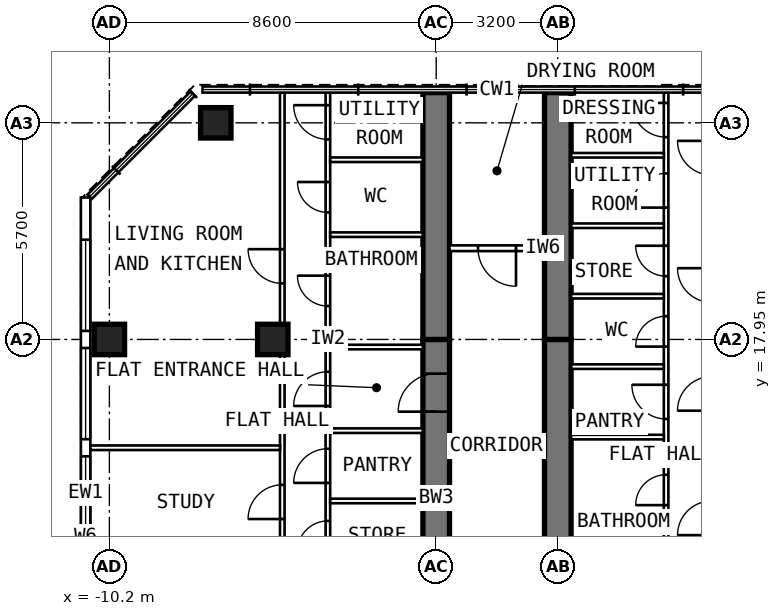
"""IFC4 building model, lengths in metres.
Left out: names, types, materials, properties, quantities, classifications, styles, units other than length and angle.
Written with IfcOpenShell. Run it as: python <this file> out.ifc"""

import sys

from ifc_helpers import new_model, si_unit, direction, frame, frame_2d, origin, origin_2d, place, context, subcontext, project, spatial, rectangle, extrude, element, fill, save


model = new_model("IFC4")
c1 = context("Model", 3, precision=1e-05, world=origin(), true_north=direction((0.0, 1.0)))
c2 = subcontext(c1, "Body", "Model", "MODEL_VIEW")
j1 = project(units=[si_unit("LENGTHUNIT", "METRE"), si_unit("PLANEANGLEUNIT", "RADIAN")], contexts=[c1])
p1 = place(None, origin())
s1 = spatial("IfcSite", under=j1, at=p1, CompositionType="ELEMENT")
p2 = place(p1, origin())
s2 = spatial("IfcBuilding", under=s1, at=p2, CompositionType="ELEMENT")
p3 = place(p2, frame((0.0, 0.0, 274.6)))
s3 = spatial("IfcBuildingStorey", under=s2, at=p3, CompositionType="ELEMENT", Elevation=274.6)
for number, where, z_axis, x_axis in (
    (1, (-10.2, 17.95, 0.0), (0.0, 0.0, 1.0), (0.0, 1.0, 0.0)),
    (2, (-7.4, 23.65, 0.0), (0.0, 0.0, 1.0), (0.0, 1.0, 0.0)),
    (3, (-5.9, 17.95, 0.0), (0.0, 0.0, 1.0), (0.0, 1.0, 0.0)),
):
    element("IfcColumn", number, at=place(p3, frame(where, z_axis=z_axis, x_axis=x_axis)), inside=s3, PredefinedType="COLUMN", context=c2, shape_type="SweptSolid", body=[
        extrude(rectangle(XDim=0.8, YDim=0.8, at=origin_2d()), origin(), (0.0, 0.0, 1.0), 3.6),
    ])
p4 = place(p3, frame((-1.6, 9.6, 0.0), z_axis=(0.0, 0.0, 1.0), x_axis=(0.0, 1.0, 0.0)))
e4 = element("IfcWall", 4, at=p4, inside=s3, PredefinedType="SHEAR", context=c2, shape_type="SweptSolid", body=[
    extrude(rectangle(XDim=8.35, YDim=0.7, at=frame_2d((4.175, 0.0))), origin(), (0.0, 0.0, 1.0), 3.6),
])
p5 = place(p4, frame((6.45, 0.0, 0.0)))
e5 = element("IfcOpeningElement", 5, at=p5, cuts=e4, PredefinedType="OPENING", context=c2, shape_type="SweptSolid", body=[
    extrude(rectangle(XDim=1.0, YDim=2.1, at=frame_2d((0.5, 1.05))), frame((0.0, 0.362, 0.0), z_axis=(0.0, -1.0, 0.0), x_axis=(1.0, 0.0, 0.0)), (0.0, 0.0, 1.0), 0.724),
])
p6 = place(p3, frame((-1.6, 17.95, 0.0), z_axis=(0.0, 0.0, 1.0), x_axis=(0.0, 1.0, 0.0)))
e6 = element("IfcWall", 6, at=p6, inside=s3, PredefinedType="SHEAR", context=c2, shape_type="SweptSolid", body=[
    extrude(rectangle(XDim=6.495, YDim=0.7, at=frame_2d((3.248, 0.0))), origin(), (0.0, 0.0, 1.0), 3.6),
])
p7 = place(p3, frame((1.6, 9.6, 0.0), z_axis=(0.0, 0.0, 1.0), x_axis=(0.0, 1.0, 0.0)))
e7 = element("IfcWall", 7, at=p7, inside=s3, PredefinedType="SHEAR", context=c2, shape_type="SweptSolid", body=[
    extrude(rectangle(XDim=8.35, YDim=0.7, at=frame_2d((4.175, 0.0))), origin(), (0.0, 0.0, 1.0), 3.6),
])
p8 = place(p7, frame((1.3, 0.0, 0.0)))
e8 = element("IfcOpeningElement", 8, at=p8, cuts=e7, PredefinedType="OPENING", context=c2, shape_type="SweptSolid", body=[
    extrude(rectangle(XDim=1.0, YDim=2.1, at=frame_2d((0.5, 1.05))), frame((0.0, 0.362, 0.0), z_axis=(0.0, -1.0, 0.0), x_axis=(1.0, 0.0, 0.0)), (0.0, 0.0, 1.0), 0.724),
])
p9 = place(p3, frame((1.6, 17.95, 0.0), z_axis=(0.0, 0.0, 1.0), x_axis=(0.0, 1.0, 0.0)))
e9 = element("IfcWall", 9, at=p9, inside=s3, PredefinedType="SHEAR", context=c2, shape_type="SweptSolid", body=[
    extrude(rectangle(XDim=6.495, YDim=0.7, at=frame_2d((3.248, 0.0))), origin(), (0.0, 0.0, 1.0), 3.6),
])
p10 = place(p3, frame((-10.825, 6.148, 0.0), z_axis=(0.0, 0.0, 1.0), x_axis=(0.0, 1.0, 0.0)))
e10 = element("IfcWall", 10, at=p10, inside=s3, PredefinedType="SOLIDWALL", context=c2, shape_type="SweptSolid", body=[
    extrude(rectangle(XDim=15.537, YDim=0.25, at=frame_2d((7.769, 0.0))), origin(), (0.0, 0.0, 1.0), 3.35),
])
p11 = place(p10, frame((0.627, 0.0, 0.6)))
e11 = element("IfcOpeningElement", 11, at=p11, cuts=e10, PredefinedType="OPENING", context=c2, shape_type="SweptSolid", body=[
    extrude(rectangle(XDim=2.4, YDim=2.0, at=frame_2d((1.2, 1.0))), frame((0.0, 0.137, 0.0), z_axis=(0.0, -1.0, 0.0), x_axis=(1.0, 0.0, 0.0)), (0.0, 0.0, 1.0), 0.274),
])
p12 = place(p10, frame((3.477, 0.0, 0.6)))
e12 = element("IfcOpeningElement", 12, at=p12, cuts=e10, PredefinedType="OPENING", context=c2, shape_type="SweptSolid", body=[
    extrude(rectangle(XDim=2.4, YDim=2.0, at=frame_2d((1.2, 1.0))), frame((0.0, 0.137, 0.0), z_axis=(0.0, -1.0, 0.0), x_axis=(1.0, 0.0, 0.0)), (0.0, 0.0, 1.0), 0.274),
])
p13 = place(p10, frame((6.327, 0.0, 0.6)))
e13 = element("IfcOpeningElement", 13, at=p13, cuts=e10, PredefinedType="OPENING", context=c2, shape_type="SweptSolid", body=[
    extrude(rectangle(XDim=2.4, YDim=2.0, at=frame_2d((1.2, 1.0))), frame((0.0, 0.137, 0.0), z_axis=(0.0, -1.0, 0.0), x_axis=(1.0, 0.0, 0.0)), (0.0, 0.0, 1.0), 0.274),
])
p14 = place(p10, frame((9.177, 0.0, 0.6)))
e14 = element("IfcOpeningElement", 14, at=p14, cuts=e10, PredefinedType="OPENING", context=c2, shape_type="SweptSolid", body=[
    extrude(rectangle(XDim=2.4, YDim=2.0, at=frame_2d((1.2, 1.0))), frame((0.0, 0.137, 0.0), z_axis=(0.0, -1.0, 0.0), x_axis=(1.0, 0.0, 0.0)), (0.0, 0.0, 1.0), 0.274),
])
p15 = place(p10, frame((12.027, 0.0, 0.6)))
e15 = element("IfcOpeningElement", 15, at=p15, cuts=e10, PredefinedType="OPENING", context=c2, shape_type="SweptSolid", body=[
    extrude(rectangle(XDim=2.4, YDim=2.0, at=frame_2d((1.2, 1.0))), frame((0.0, 0.137, 0.0), z_axis=(0.0, -1.0, 0.0), x_axis=(1.0, 0.0, 0.0)), (0.0, 0.0, 1.0), 0.274),
])
p16 = place(p3, frame((-4.45, 9.875, 0.0), z_axis=(0.0, 0.0, 1.0), x_axis=(0.0, 1.0, 0.0)))
e16 = element("IfcWall", 16, at=p16, inside=s3, PredefinedType="PARTITIONING", context=c2, shape_type="SweptSolid", body=[
    extrude(rectangle(XDim=14.57, YDim=0.12, at=frame_2d((7.285, 0.0))), origin(), (0.0, 0.0, 1.0), 3.35),
])
p17 = place(p16, frame((0.6, 0.0, 0.0)))
e17 = element("IfcOpeningElement", 17, at=p17, cuts=e16, PredefinedType="OPENING", context=c2, shape_type="SweptSolid", body=[
    extrude(rectangle(XDim=0.9, YDim=2.1, at=frame_2d((0.45, 1.05))), frame((0.0, 0.072, 0.0), z_axis=(0.0, -1.0, 0.0), x_axis=(1.0, 0.0, 0.0)), (0.0, 0.0, 1.0), 0.144),
])
p18 = place(p16, frame((2.5, 0.0, 0.0)))
e18 = element("IfcOpeningElement", 18, at=p18, cuts=e16, PredefinedType="OPENING", context=c2, shape_type="SweptSolid", body=[
    extrude(rectangle(XDim=0.8, YDim=2.1, at=frame_2d((0.4, 1.05))), frame((0.0, 0.072, 0.0), z_axis=(0.0, -1.0, 0.0), x_axis=(1.0, 0.0, 0.0)), (0.0, 0.0, 1.0), 0.144),
])
p19 = place(p16, frame((4.3, 0.0, 0.0)))
e19 = element("IfcOpeningElement", 19, at=p19, cuts=e16, PredefinedType="OPENING", context=c2, shape_type="SweptSolid", body=[
    extrude(rectangle(XDim=0.9, YDim=2.1, at=frame_2d((0.45, 1.05))), frame((0.0, 0.072, 0.0), z_axis=(0.0, -1.0, 0.0), x_axis=(1.0, 0.0, 0.0)), (0.0, 0.0, 1.0), 0.144),
])
p20 = place(p16, frame((6.325, 0.0, 0.0)))
e20 = element("IfcOpeningElement", 20, at=p20, cuts=e16, PredefinedType="OPENING", context=c2, shape_type="SweptSolid", body=[
    extrude(rectangle(XDim=0.9, YDim=2.1, at=frame_2d((0.45, 1.05))), frame((0.0, 0.072, 0.0), z_axis=(0.0, -1.0, 0.0), x_axis=(1.0, 0.0, 0.0)), (0.0, 0.0, 1.0), 0.144),
])
p21 = place(p16, frame((8.954, 0.0, 0.0)))
e21 = element("IfcOpeningElement", 21, at=p21, cuts=e16, PredefinedType="OPENING", context=c2, shape_type="SweptSolid", body=[
    extrude(rectangle(XDim=0.8, YDim=2.1, at=frame_2d((0.4, 1.05))), frame((0.0, 0.072, 0.0), z_axis=(0.0, -1.0, 0.0), x_axis=(1.0, 0.0, 0.0)), (0.0, 0.0, 1.0), 0.144),
])
p22 = place(p16, frame((11.418, 0.0, 0.0)))
e22 = element("IfcOpeningElement", 22, at=p22, cuts=e16, PredefinedType="OPENING", context=c2, shape_type="SweptSolid", body=[
    extrude(rectangle(XDim=0.8, YDim=2.1, at=frame_2d((0.4, 1.05))), frame((0.0, 0.072, 0.0), z_axis=(0.0, -1.0, 0.0), x_axis=(1.0, 0.0, 0.0)), (0.0, 0.0, 1.0), 0.144),
])
p23 = place(p16, frame((13.339, 0.0, 0.0)))
e23 = element("IfcOpeningElement", 23, at=p23, cuts=e16, PredefinedType="OPENING", context=c2, shape_type="SweptSolid", body=[
    extrude(rectangle(XDim=0.9, YDim=2.1, at=frame_2d((0.45, 1.05))), frame((0.0, 0.072, 0.0), z_axis=(0.0, -1.0, 0.0), x_axis=(1.0, 0.0, 0.0)), (0.0, 0.0, 1.0), 0.144),
])
p24 = place(p3, frame((-5.65, 9.6, 0.0), z_axis=(0.0, 0.0, 1.0), x_axis=(0.0, 1.0, 0.0)))
e24 = element("IfcWall", 24, at=p24, inside=s3, PredefinedType="PARTITIONING", context=c2, shape_type="SweptSolid", body=[
    extrude(rectangle(XDim=14.845, YDim=0.12, at=frame_2d((7.422, 0.0))), origin(), (0.0, 0.0, 1.0), 3.35),
])
p25 = place(p24, frame((1.075, 0.0, 0.0)))
e25 = element("IfcOpeningElement", 25, at=p25, cuts=e24, PredefinedType="OPENING", context=c2, shape_type="SweptSolid", body=[
    extrude(rectangle(XDim=0.9, YDim=2.1, at=frame_2d((0.45, 1.05))), frame((0.0, 0.072, 0.0), z_axis=(0.0, -1.0, 0.0), x_axis=(1.0, 0.0, 0.0)), (0.0, 0.0, 1.0), 0.144),
])
p26 = place(p24, frame((3.625, 0.0, 0.0)))
e26 = element("IfcOpeningElement", 26, at=p26, cuts=e24, PredefinedType="OPENING", context=c2, shape_type="SweptSolid", body=[
    extrude(rectangle(XDim=0.9, YDim=2.1, at=frame_2d((0.45, 1.05))), frame((0.0, 0.072, 0.0), z_axis=(0.0, -1.0, 0.0), x_axis=(1.0, 0.0, 0.0)), (0.0, 0.0, 1.0), 0.144),
])
p27 = place(p24, frame((9.825, 0.0, 0.0)))
e27 = element("IfcOpeningElement", 27, at=p27, cuts=e24, PredefinedType="OPENING", context=c2, shape_type="SweptSolid", body=[
    extrude(rectangle(XDim=0.9, YDim=2.1, at=frame_2d((0.45, 1.05))), frame((0.0, 0.072, 0.0), z_axis=(0.0, -1.0, 0.0), x_axis=(1.0, 0.0, 0.0)), (0.0, 0.0, 1.0), 0.144),
])
p28 = place(p3, frame((-5.71, 15.1, 0.0), z_axis=(0.0, 0.0, 1.0), x_axis=(-1.0, 0.0, 0.0)))
e28 = element("IfcWall", 28, at=p28, inside=s3, PredefinedType="PARTITIONING", context=c2, shape_type="SweptSolid", body=[
    extrude(rectangle(XDim=4.99, YDim=0.12, at=frame_2d((2.495, 0.0))), origin(), (0.0, 0.0, 1.0), 3.35),
])
for number, where, z_axis, x_axis in (
    (29, (-1.95, 13.7, 0.0), (0.0, 0.0, 1.0), (-1.0, 0.0, 0.0)),
    (30, (-1.95, 15.55, 0.0), (0.0, 0.0, 1.0), (-1.0, 0.0, 0.0)),
):
    element("IfcWall", number, at=place(p3, frame(where, z_axis=z_axis, x_axis=x_axis)), inside=s3, PredefinedType="PARTITIONING", context=c2, shape_type="SweptSolid", body=[
        extrude(rectangle(XDim=2.44, YDim=0.12, at=frame_2d((1.22, 0.0))), origin(), (0.0, 0.0, 1.0), 3.35),
    ])
p29 = place(p3, frame((-1.95, 17.75, 0.0), z_axis=(0.0, 0.0, 1.0), x_axis=(-1.0, 0.0, 0.0)))
e31 = element("IfcWall", 31, at=p29, inside=s3, PredefinedType="PARTITIONING", context=c2, shape_type="SweptSolid", body=[
    extrude(rectangle(XDim=2.44, YDim=0.12, at=frame_2d((1.22, 0.0))), origin(), (0.0, 0.0, 1.0), 2.45),
])
for number, where, z_axis, x_axis in (
    (32, (-1.95, 20.707, 0.0), (0.0, 0.0, 1.0), (-1.0, 0.0, 0.0)),
    (33, (-1.95, 22.678, 0.0), (0.0, 0.0, 1.0), (-1.0, 0.0, 0.0)),
):
    element("IfcWall", number, at=place(p3, frame(where, z_axis=z_axis, x_axis=x_axis)), inside=s3, PredefinedType="PARTITIONING", context=c2, shape_type="SweptSolid", body=[
        extrude(rectangle(XDim=2.44, YDim=0.12, at=frame_2d((1.22, 0.0))), origin(), (0.0, 0.0, 1.0), 3.35),
    ])
p30 = place(p3, frame((4.45, 9.875, 0.0), z_axis=(0.0, 0.0, 1.0), x_axis=(0.0, 1.0, 0.0)))
e34 = element("IfcWall", 34, at=p30, inside=s3, PredefinedType="PARTITIONING", context=c2, shape_type="SweptSolid", body=[
    extrude(rectangle(XDim=14.57, YDim=0.12, at=frame_2d((7.285, 0.0))), origin(), (0.0, 0.0, 1.0), 3.35),
])
p31 = place(p30, frame((0.975, 0.0, 0.0)))
e35 = element("IfcOpeningElement", 35, at=p31, cuts=e34, PredefinedType="OPENING", context=c2, shape_type="SweptSolid", body=[
    extrude(rectangle(XDim=0.9, YDim=2.1, at=frame_2d((0.45, 1.05))), frame((0.0, 0.072, 0.0), z_axis=(0.0, -1.0, 0.0), x_axis=(1.0, 0.0, 0.0)), (0.0, 0.0, 1.0), 0.144),
])
p32 = place(p30, frame((3.715, 0.0, 0.0)))
e36 = element("IfcOpeningElement", 36, at=p32, cuts=e34, PredefinedType="OPENING", context=c2, shape_type="SweptSolid", body=[
    extrude(rectangle(XDim=0.8, YDim=2.1, at=frame_2d((0.4, 1.05))), frame((0.0, 0.072, 0.0), z_axis=(0.0, -1.0, 0.0), x_axis=(1.0, 0.0, 0.0)), (0.0, 0.0, 1.0), 0.144),
])
p33 = place(p30, frame((5.983, 0.0, 0.0)))
e37 = element("IfcOpeningElement", 37, at=p33, cuts=e34, PredefinedType="OPENING", context=c2, shape_type="SweptSolid", body=[
    extrude(rectangle(XDim=0.9, YDim=2.1, at=frame_2d((0.45, 1.05))), frame((0.0, 0.072, 0.0), z_axis=(0.0, -1.0, 0.0), x_axis=(1.0, 0.0, 0.0)), (0.0, 0.0, 1.0), 0.144),
])
p34 = place(p30, frame((7.886, 0.0, 0.0)))
e38 = element("IfcOpeningElement", 38, at=p34, cuts=e34, PredefinedType="OPENING", context=c2, shape_type="SweptSolid", body=[
    extrude(rectangle(XDim=0.8, YDim=2.1, at=frame_2d((0.4, 1.05))), frame((0.0, 0.072, 0.0), z_axis=(0.0, -1.0, 0.0), x_axis=(1.0, 0.0, 0.0)), (0.0, 0.0, 1.0), 0.144),
])
p35 = place(p30, frame((9.74, 0.0, 0.0)))
e39 = element("IfcOpeningElement", 39, at=p35, cuts=e34, PredefinedType="OPENING", context=c2, shape_type="SweptSolid", body=[
    extrude(rectangle(XDim=0.8, YDim=2.1, at=frame_2d((0.4, 1.05))), frame((0.0, 0.072, 0.0), z_axis=(0.0, -1.0, 0.0), x_axis=(1.0, 0.0, 0.0)), (0.0, 0.0, 1.0), 0.144),
])
p36 = place(p30, frame((11.544, 0.0, 0.0)))
e40 = element("IfcOpeningElement", 40, at=p36, cuts=e34, PredefinedType="OPENING", context=c2, shape_type="SweptSolid", body=[
    extrude(rectangle(XDim=0.9, YDim=2.1, at=frame_2d((0.45, 1.05))), frame((0.0, 0.072, 0.0), z_axis=(0.0, -1.0, 0.0), x_axis=(1.0, 0.0, 0.0)), (0.0, 0.0, 1.0), 0.144),
])
p37 = place(p30, frame((13.398, 0.0, 0.0)))
e41 = element("IfcOpeningElement", 41, at=p37, cuts=e34, PredefinedType="OPENING", context=c2, shape_type="SweptSolid", body=[
    extrude(rectangle(XDim=0.9, YDim=2.1, at=frame_2d((0.45, 1.05))), frame((0.0, 0.072, 0.0), z_axis=(0.0, -1.0, 0.0), x_axis=(1.0, 0.0, 0.0)), (0.0, 0.0, 1.0), 0.144),
])
for number, where, z_axis, x_axis in (
    (42, (1.95, 15.381, 0.0), (0.0, 0.0, 1.0), (1.0, 0.0, 0.0)),
    (43, (1.95, 17.235, 0.0), (0.0, 0.0, 1.0), (1.0, 0.0, 0.0)),
    (44, (1.95, 19.088, 0.0), (0.0, 0.0, 1.0), (1.0, 0.0, 0.0)),
    (45, (1.95, 20.942, 0.0), (0.0, 0.0, 1.0), (1.0, 0.0, 0.0)),
    (46, (1.95, 22.796, 0.0), (0.0, 0.0, 1.0), (1.0, 0.0, 0.0)),
):
    element("IfcWall", number, at=place(p3, frame(where, z_axis=z_axis, x_axis=x_axis)), inside=s3, PredefinedType="PARTITIONING", context=c2, shape_type="SweptSolid", body=[
        extrude(rectangle(XDim=2.44, YDim=0.12, at=frame_2d((1.22, 0.0))), origin(), (0.0, 0.0, 1.0), 3.35),
    ])
p38 = place(p3, frame((1.25, 20.35, 0.0), z_axis=(0.0, 0.0, 1.0), x_axis=(-1.0, 0.0, 0.0)))
e47 = element("IfcWall", 47, at=p38, inside=s3, PredefinedType="PARTITIONING", context=c2, shape_type="SweptSolid", body=[
    extrude(rectangle(XDim=2.5, YDim=0.15, at=frame_2d((1.25, 0.0))), origin(), (0.0, 0.0, 1.0), 3.35),
])
p39 = place(p38, frame((0.75, 0.0, 0.0)))
e48 = element("IfcOpeningElement", 48, at=p39, cuts=e47, PredefinedType="OPENING", context=c2, shape_type="SweptSolid", body=[
    extrude(rectangle(XDim=1.0, YDim=2.1, at=frame_2d((0.5, 1.05))), frame((0.0, 0.087, 0.0), z_axis=(0.0, -1.0, 0.0), x_axis=(1.0, 0.0, 0.0)), (0.0, 0.0, 1.0), 0.174),
])
p40 = place(p13, origin())
e49 = element("IfcWindow", 49, at=p40, inside=s3, PartitioningType="SINGLE_PANEL", PredefinedType="WINDOW", context=c2, shape_type="SweptSolid", body=[
    extrude(rectangle(XDim=2.4, YDim=2.0, at=frame_2d((1.2, 1.0))), frame((0.0, 0.03, 0.0), z_axis=(0.0, -1.0, 0.0), x_axis=(1.0, 0.0, 0.0)), (0.0, 0.0, 1.0), 0.06),
])
fill(e13, e49)
p41 = place(p14, origin())
e50 = element("IfcWindow", 50, at=p41, inside=s3, PartitioningType="SINGLE_PANEL", PredefinedType="WINDOW", context=c2, shape_type="SweptSolid", body=[
    extrude(rectangle(XDim=2.4, YDim=2.0, at=frame_2d((1.2, 1.0))), frame((0.0, 0.03, 0.0), z_axis=(0.0, -1.0, 0.0), x_axis=(1.0, 0.0, 0.0)), (0.0, 0.0, 1.0), 0.06),
])
fill(e14, e50)
p42 = place(p15, origin())
e51 = element("IfcWindow", 51, at=p42, inside=s3, PartitioningType="SINGLE_PANEL", PredefinedType="WINDOW", context=c2, shape_type="SweptSolid", body=[
    extrude(rectangle(XDim=2.4, YDim=2.0, at=frame_2d((1.2, 1.0))), frame((0.0, 0.03, 0.0), z_axis=(0.0, -1.0, 0.0), x_axis=(1.0, 0.0, 0.0)), (0.0, 0.0, 1.0), 0.06),
])
fill(e15, e51)
p43 = place(p5, origin())
e52 = element("IfcDoor", 52, at=p43, inside=s3, OperationType="SINGLE_SWING_LEFT", PredefinedType="DOOR", context=c2, shape_type="SweptSolid", body=[
    extrude(rectangle(XDim=1.0, YDim=2.1, at=frame_2d((0.5, 1.05))), frame((0.0, 0.1, 0.0), z_axis=(0.0, -1.0, 0.0), x_axis=(1.0, 0.0, 0.0)), (0.0, 0.0, 1.0), 0.2),
])
fill(e5, e52)
p44 = place(p26, origin())
e53 = element("IfcDoor", 53, at=p44, inside=s3, OperationType="SINGLE_SWING_LEFT", PredefinedType="DOOR", context=c2, shape_type="SweptSolid", body=[
    extrude(rectangle(XDim=0.9, YDim=2.1, at=frame_2d((0.45, 1.05))), frame((0.0, 0.025, 0.0), z_axis=(0.0, -1.0, 0.0), x_axis=(1.0, 0.0, 0.0)), (0.0, 0.0, 1.0), 0.05),
])
fill(e26, e53)
p45 = place(p27, origin())
e54 = element("IfcDoor", 54, at=p45, inside=s3, OperationType="SINGLE_SWING_RIGHT", PredefinedType="DOOR", context=c2, shape_type="SweptSolid", body=[
    extrude(rectangle(XDim=0.9, YDim=2.1, at=frame_2d((0.45, 1.05))), frame((0.0, 0.025, 0.0), z_axis=(0.0, -1.0, 0.0), x_axis=(1.0, 0.0, 0.0)), (0.0, 0.0, 1.0), 0.05),
])
fill(e27, e54)
p46 = place(p18, origin())
e55 = element("IfcDoor", 55, at=p46, inside=s3, OperationType="SINGLE_SWING_LEFT", PredefinedType="DOOR", context=c2, shape_type="SweptSolid", body=[
    extrude(rectangle(XDim=0.8, YDim=2.1, at=frame_2d((0.4, 1.05))), frame((0.0, 0.025, 0.0), z_axis=(0.0, -1.0, 0.0), x_axis=(1.0, 0.0, 0.0)), (0.0, 0.0, 1.0), 0.05),
])
fill(e18, e55)
p47 = place(p19, origin())
e56 = element("IfcDoor", 56, at=p47, inside=s3, OperationType="SINGLE_SWING_LEFT", PredefinedType="DOOR", context=c2, shape_type="SweptSolid", body=[
    extrude(rectangle(XDim=0.9, YDim=2.1, at=frame_2d((0.45, 1.05))), frame((0.0, 0.025, 0.0), z_axis=(0.0, -1.0, 0.0), x_axis=(1.0, 0.0, 0.0)), (0.0, 0.0, 1.0), 0.05),
])
fill(e19, e56)
p48 = place(p20, origin())
e57 = element("IfcDoor", 57, at=p48, inside=s3, OperationType="SINGLE_SWING_LEFT", PredefinedType="DOOR", context=c2, shape_type="SweptSolid", body=[
    extrude(rectangle(XDim=0.9, YDim=2.1, at=frame_2d((0.45, 1.05))), frame((0.0, 0.025, 0.0), z_axis=(0.0, -1.0, 0.0), x_axis=(1.0, 0.0, 0.0)), (0.0, 0.0, 1.0), 0.05),
])
fill(e20, e57)
p49 = place(p21, origin())
e58 = element("IfcDoor", 58, at=p49, inside=s3, OperationType="SINGLE_SWING_RIGHT", PredefinedType="DOOR", context=c2, shape_type="SweptSolid", body=[
    extrude(rectangle(XDim=0.8, YDim=2.1, at=frame_2d((0.4, 1.05))), frame((0.0, 0.025, 0.0), z_axis=(0.0, -1.0, 0.0), x_axis=(1.0, 0.0, 0.0)), (0.0, 0.0, 1.0), 0.05),
])
fill(e21, e58)
p50 = place(p22, origin())
e59 = element("IfcDoor", 59, at=p50, inside=s3, OperationType="SINGLE_SWING_RIGHT", PredefinedType="DOOR", context=c2, shape_type="SweptSolid", body=[
    extrude(rectangle(XDim=0.8, YDim=2.1, at=frame_2d((0.4, 1.05))), frame((0.0, 0.025, 0.0), z_axis=(0.0, -1.0, 0.0), x_axis=(1.0, 0.0, 0.0)), (0.0, 0.0, 1.0), 0.05),
])
fill(e22, e59)
p51 = place(p23, origin())
e60 = element("IfcDoor", 60, at=p51, inside=s3, OperationType="SINGLE_SWING_RIGHT", PredefinedType="DOOR", context=c2, shape_type="SweptSolid", body=[
    extrude(rectangle(XDim=0.9, YDim=2.1, at=frame_2d((0.45, 1.05))), frame((0.0, 0.025, 0.0), z_axis=(0.0, -1.0, 0.0), x_axis=(1.0, 0.0, 0.0)), (0.0, 0.0, 1.0), 0.05),
])
fill(e23, e60)
p52 = place(p32, origin())
e61 = element("IfcDoor", 61, at=p52, inside=s3, OperationType="SINGLE_SWING_LEFT", PredefinedType="DOOR", context=c2, shape_type="SweptSolid", body=[
    extrude(rectangle(XDim=0.8, YDim=2.1, at=frame_2d((0.4, 1.05))), frame((0.0, 0.025, 0.0), z_axis=(0.0, -1.0, 0.0), x_axis=(1.0, 0.0, 0.0)), (0.0, 0.0, 1.0), 0.05),
])
fill(e36, e61)
p53 = place(p33, origin())
e62 = element("IfcDoor", 62, at=p53, inside=s3, OperationType="SINGLE_SWING_RIGHT", PredefinedType="DOOR", context=c2, shape_type="SweptSolid", body=[
    extrude(rectangle(XDim=0.9, YDim=2.1, at=frame_2d((0.45, 1.05))), frame((0.0, 0.025, 0.0), z_axis=(0.0, -1.0, 0.0), x_axis=(1.0, 0.0, 0.0)), (0.0, 0.0, 1.0), 0.05),
])
fill(e37, e62)
p54 = place(p34, origin())
e63 = element("IfcDoor", 63, at=p54, inside=s3, OperationType="SINGLE_SWING_LEFT", PredefinedType="DOOR", context=c2, shape_type="SweptSolid", body=[
    extrude(rectangle(XDim=0.8, YDim=2.1, at=frame_2d((0.4, 1.05))), frame((0.0, 0.025, 0.0), z_axis=(0.0, -1.0, 0.0), x_axis=(1.0, 0.0, 0.0)), (0.0, 0.0, 1.0), 0.05),
])
fill(e38, e63)
p55 = place(p35, origin())
e64 = element("IfcDoor", 64, at=p55, inside=s3, OperationType="SINGLE_SWING_RIGHT", PredefinedType="DOOR", context=c2, shape_type="SweptSolid", body=[
    extrude(rectangle(XDim=0.8, YDim=2.1, at=frame_2d((0.4, 1.05))), frame((0.0, 0.025, 0.0), z_axis=(0.0, -1.0, 0.0), x_axis=(1.0, 0.0, 0.0)), (0.0, 0.0, 1.0), 0.05),
])
fill(e39, e64)
p56 = place(p36, origin())
e65 = element("IfcDoor", 65, at=p56, inside=s3, OperationType="SINGLE_SWING_LEFT", PredefinedType="DOOR", context=c2, shape_type="SweptSolid", body=[
    extrude(rectangle(XDim=0.9, YDim=2.1, at=frame_2d((0.45, 1.05))), frame((0.0, 0.025, 0.0), z_axis=(0.0, -1.0, 0.0), x_axis=(1.0, 0.0, 0.0)), (0.0, 0.0, 1.0), 0.05),
])
fill(e40, e65)
p57 = place(p37, origin())
e66 = element("IfcDoor", 66, at=p57, inside=s3, OperationType="SINGLE_SWING_RIGHT", PredefinedType="DOOR", context=c2, shape_type="SweptSolid", body=[
    extrude(rectangle(XDim=0.9, YDim=2.1, at=frame_2d((0.45, 1.05))), frame((0.0, 0.025, 0.0), z_axis=(0.0, -1.0, 0.0), x_axis=(1.0, 0.0, 0.0)), (0.0, 0.0, 1.0), 0.05),
])
fill(e41, e66)
p58 = place(p39, origin())
e67 = element("IfcDoor", 67, at=p58, inside=s3, OperationType="SINGLE_SWING_LEFT", PredefinedType="DOOR", context=c2, shape_type="SweptSolid", body=[
    extrude(rectangle(XDim=1.0, YDim=2.1, at=frame_2d((0.5, 1.05))), frame((0.0, 0.025, 0.0), z_axis=(0.0, -1.0, 0.0), x_axis=(1.0, 0.0, 0.0)), (0.0, 0.0, 1.0), 0.05),
])
fill(e48, e67)
save(model, sys.argv[1])
